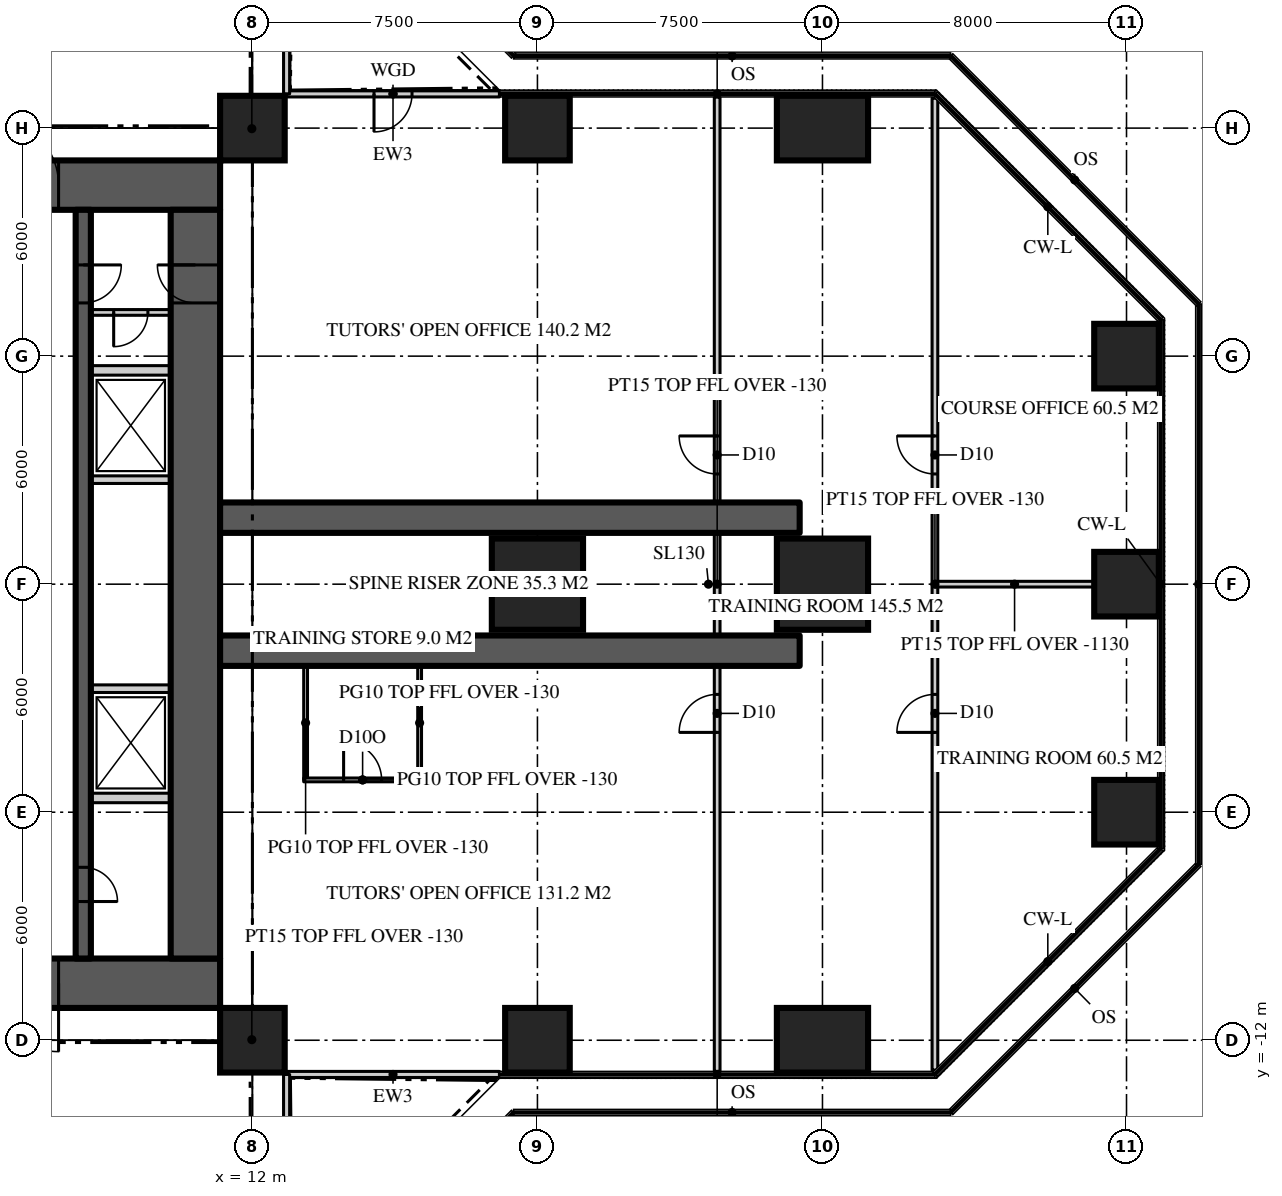
"""IFC4 building model, lengths in metres.
Left out: names, types, materials, properties, quantities, classifications, styles, units other than length and angle.
Written with IfcOpenShell. Run it as: python <this file> out.ifc"""

import sys

from ifc_helpers import new_model, si_unit, direction, frame, frame_2d, origin, origin_2d, place, context, subcontext, project, spatial, rectangle, extrude, element, fill, save


model = new_model("IFC4")
c1 = context("Model", 3, precision=1e-05, world=origin(), true_north=direction((0.0, 1.0)))
c2 = subcontext(c1, "Body", "Model", "MODEL_VIEW")
j1 = project(units=[si_unit("LENGTHUNIT", "METRE"), si_unit("PLANEANGLEUNIT", "RADIAN")], contexts=[c1])
p1 = place(None, origin())
s1 = spatial("IfcSite", under=j1, at=p1, CompositionType="ELEMENT")
p2 = place(p1, origin())
s2 = spatial("IfcBuilding", under=s1, at=p2, CompositionType="ELEMENT")
p3 = place(p2, frame((0.0, 0.0, 109.8)))
s3 = spatial("IfcBuildingStorey", under=s2, at=p3, CompositionType="ELEMENT", Elevation=109.8)
p4 = place(p3, frame((-11.15, 10.5, 0.0), z_axis=(0.0, 0.0, 1.0), x_axis=(1.0, 0.0, 0.0)))
e1 = element("IfcWall", 1, at=p4, inside=s3, PredefinedType="SHEAR", context=c2, shape_type="SweptSolid", body=[
    extrude(rectangle(XDim=22.3, YDim=1.3, at=frame_2d((11.15, 0.0))), origin(), (0.0, 0.0, 1.0), 3.9),
])
p5 = place(p4, frame((4.25, 0.0, 0.0)))
e2 = element("IfcOpeningElement", 2, at=p5, cuts=e1, PredefinedType="OPENING", context=c2, shape_type="SweptSolid", body=[
    extrude(rectangle(XDim=1.8, YDim=2.2, at=frame_2d((0.9, 1.1))), frame((0.0, 0.66, 0.0), z_axis=(0.0, -1.0, 0.0), x_axis=(1.0, 0.0, 0.0)), (0.0, 0.0, 1.0), 1.32),
])
p6 = place(p4, frame((16.25, 0.0, 0.0)))
e3 = element("IfcOpeningElement", 3, at=p6, cuts=e1, PredefinedType="OPENING", context=c2, shape_type="SweptSolid", body=[
    extrude(rectangle(XDim=1.8, YDim=2.2, at=frame_2d((0.9, 1.1))), frame((0.0, 0.66, 0.0), z_axis=(0.0, -1.0, 0.0), x_axis=(1.0, 0.0, 0.0)), (0.0, 0.0, 1.0), 1.32),
])
p7 = place(p3, frame((11.15, -10.5, 0.0), z_axis=(0.0, 0.0, 1.0), x_axis=(-1.0, 0.0, 0.0)))
e4 = element("IfcWall", 4, at=p7, inside=s3, PredefinedType="SHEAR", context=c2, shape_type="SweptSolid", body=[
    extrude(rectangle(XDim=22.3, YDim=1.3, at=frame_2d((11.15, 0.0))), origin(), (0.0, 0.0, 1.0), 3.9),
])
p8 = place(p7, frame((16.25, 0.0, 0.0)))
e5 = element("IfcOpeningElement", 5, at=p8, cuts=e4, PredefinedType="OPENING", context=c2, shape_type="SweptSolid", body=[
    extrude(rectangle(XDim=1.8, YDim=2.2, at=frame_2d((0.9, 1.1))), frame((0.0, 0.66, 0.0), z_axis=(0.0, -1.0, 0.0), x_axis=(1.0, 0.0, 0.0)), (0.0, 0.0, 1.0), 1.32),
])
p9 = place(p7, frame((4.25, 0.0, 0.0)))
e6 = element("IfcOpeningElement", 6, at=p9, cuts=e4, PredefinedType="OPENING", context=c2, shape_type="SweptSolid", body=[
    extrude(rectangle(XDim=1.8, YDim=2.2, at=frame_2d((0.9, 1.1))), frame((0.0, 0.66, 0.0), z_axis=(0.0, -1.0, 0.0), x_axis=(1.0, 0.0, 0.0)), (0.0, 0.0, 1.0), 1.32),
])
p10 = place(p3, frame((10.5, -9.85, 0.0), z_axis=(0.0, 0.0, 1.0), x_axis=(0.0, 1.0, 0.0)))
e7 = element("IfcWall", 7, at=p10, inside=s3, PredefinedType="SHEAR", context=c2, shape_type="SweptSolid", body=[
    extrude(rectangle(XDim=19.7, YDim=1.3, at=frame_2d((9.85, 0.0))), origin(), (0.0, 0.0, 1.0), 3.9),
])
p11 = place(p10, frame((17.25, 0.0, 0.0)))
e8 = element("IfcOpeningElement", 8, at=p11, cuts=e7, PredefinedType="OPENING", context=c2, shape_type="SweptSolid", body=[
    extrude(rectangle(XDim=1.0, YDim=2.2, at=frame_2d((0.5, 1.1))), frame((0.0, 0.66, 0.0), z_axis=(0.0, -1.0, 0.0), x_axis=(1.0, 0.0, 0.0)), (0.0, 0.0, 1.0), 1.32),
])
for number, where, z_axis, x_axis in (
    (9, (11.15, -1.75, 0.0), (0.0, 0.0, 1.0), (1.0, 0.0, 0.0)),
    (10, (11.15, 1.75, 0.0), (0.0, 0.0, 1.0), (1.0, 0.0, 0.0)),
):
    element("IfcWall", number, at=place(p3, frame(where, z_axis=z_axis, x_axis=x_axis)), inside=s3, PredefinedType="SHEAR", context=c2, shape_type="SweptSolid", body=[
        extrude(rectangle(XDim=15.25, YDim=0.8, at=frame_2d((7.625, 0.0))), origin(), (0.0, 0.0, 1.0), 3.9),
    ])
for number, where, z_axis, x_axis in (
    (11, (12.0, -12.0, 0.0), (0.0, 0.0, 1.0), (1.0, 0.0, 0.0)),
    (12, (19.5, -12.0, 0.0), (0.0, 0.0, 1.0), (1.0, 0.0, 0.0)),
):
    element("IfcColumn", number, at=place(p3, frame(where, z_axis=z_axis, x_axis=x_axis)), inside=s3, PredefinedType="COLUMN", context=c2, shape_type="SweptSolid", body=[
        extrude(rectangle(XDim=1.7, YDim=1.7, at=origin_2d()), origin(), (0.0, 0.0, 1.0), 3.9),
    ])
p12 = place(p3, frame((27.0, -12.0, 0.0), z_axis=(0.0, 0.0, 1.0), x_axis=(0.0, 1.0, 0.0)))
e13 = element("IfcColumn", 13, at=p12, inside=s3, PredefinedType="COLUMN", context=c2, shape_type="SweptSolid", body=[
    extrude(rectangle(XDim=1.7, YDim=2.4, at=origin_2d()), origin(), (0.0, 0.0, 1.0), 3.9),
])
p13 = place(p3, frame((35.0, -6.0, 0.0), z_axis=(0.0, 0.0, 1.0), x_axis=(1.0, 0.0, 0.0)))
e14 = element("IfcColumn", 14, at=p13, inside=s3, PredefinedType="COLUMN", context=c2, shape_type="SweptSolid", body=[
    extrude(rectangle(XDim=1.7, YDim=1.7, at=origin_2d()), origin(), (0.0, 0.0, 1.0), 3.9),
])
for number, where, z_axis, x_axis in (
    (15, (19.5, 0.0, 0.0), (0.0, 0.0, 1.0), (1.0, 0.0, 0.0)),
    (16, (27.0, 0.0, 0.0), (0.0, 0.0, 1.0), (1.0, 0.0, 0.0)),
):
    element("IfcColumn", number, at=place(p3, frame(where, z_axis=z_axis, x_axis=x_axis)), inside=s3, PredefinedType="COLUMN", context=c2, shape_type="SweptSolid", body=[
        extrude(rectangle(XDim=2.4, YDim=2.4, at=origin_2d()), origin(), (0.0, 0.0, 1.0), 3.9),
    ])
for number, where, z_axis, x_axis in (
    (17, (35.0, 0.0, 0.0), (0.0, 0.0, 1.0), (1.0, 0.0, 0.0)),
    (18, (35.0, 6.0, 0.0), (0.0, 0.0, 1.0), (1.0, 0.0, 0.0)),
    (19, (12.0, 12.0, 0.0), (0.0, 0.0, 1.0), (1.0, 0.0, 0.0)),
    (20, (19.5, 12.0, 0.0), (0.0, 0.0, 1.0), (1.0, 0.0, 0.0)),
):
    element("IfcColumn", number, at=place(p3, frame(where, z_axis=z_axis, x_axis=x_axis)), inside=s3, PredefinedType="COLUMN", context=c2, shape_type="SweptSolid", body=[
        extrude(rectangle(XDim=1.7, YDim=1.7, at=origin_2d()), origin(), (0.0, 0.0, 1.0), 3.9),
    ])
p14 = place(p3, frame((27.0, 12.0, 0.0), z_axis=(0.0, 0.0, 1.0), x_axis=(0.0, 1.0, 0.0)))
e21 = element("IfcColumn", 21, at=p14, inside=s3, PredefinedType="COLUMN", context=c2, shape_type="SweptSolid", body=[
    extrude(rectangle(XDim=1.7, YDim=2.4, at=origin_2d()), origin(), (0.0, 0.0, 1.0), 3.9),
])
p15 = place(p3, frame((12.9, -12.9, 0.0), z_axis=(0.0, 0.0, 1.0), x_axis=(1.0, 0.0, 0.0)))
e22 = element("IfcWall", 22, at=p15, inside=s3, PredefinedType="SOLIDWALL", context=c2, shape_type="SweptSolid", body=[
    extrude(rectangle(XDim=5.6, YDim=0.16, at=frame_2d((2.8, 0.0))), origin(), (0.0, 0.0, 1.0), 3.77),
])
p16 = place(p3, frame((18.5, 12.9, 0.0), z_axis=(0.0, 0.0, 1.0), x_axis=(-1.0, 0.0, 0.0)))
e23 = element("IfcWall", 23, at=p16, inside=s3, PredefinedType="SOLIDWALL", context=c2, shape_type="SweptSolid", body=[
    extrude(rectangle(XDim=5.6, YDim=0.16, at=frame_2d((2.8, 0.0))), origin(), (0.0, 0.0, 1.0), 3.77),
])
p17 = place(p16, frame((2.3, 0.0, 0.0)))
e24 = element("IfcOpeningElement", 24, at=p17, cuts=e23, PredefinedType="OPENING", context=c2, shape_type="SweptSolid", body=[
    extrude(rectangle(XDim=1.0, YDim=2.2, at=frame_2d((0.5, 1.1))), frame((0.0, 0.09, 0.0), z_axis=(0.0, -1.0, 0.0), x_axis=(1.0, 0.0, 0.0)), (0.0, 0.0, 1.0), 0.18),
])
p18 = place(p3, frame((12.9, 12.9, 0.0), z_axis=(0.0, 0.0, 1.0), x_axis=(0.0, 1.0, 0.0)))
e25 = element("IfcWall", 25, at=p18, inside=s3, PredefinedType="SOLIDWALL", context=c2, shape_type="SweptSolid", body=[
    extrude(rectangle(XDim=5.6, YDim=0.16, at=frame_2d((2.8, 0.0))), origin(), (0.0, 0.0, 1.0), 3.77),
])
p19 = place(p3, frame((12.9, -18.5, 0.0), z_axis=(0.0, 0.0, 1.0), x_axis=(0.0, 1.0, 0.0)))
e26 = element("IfcWall", 26, at=p19, inside=s3, PredefinedType="SOLIDWALL", context=c2, shape_type="SweptSolid", body=[
    extrude(rectangle(XDim=5.6, YDim=0.16, at=frame_2d((2.8, 0.0))), origin(), (0.0, 0.0, 1.0), 3.77),
])
p20 = place(p19, frame((2.3, 0.0, 0.0)))
e27 = element("IfcOpeningElement", 27, at=p20, cuts=e26, PredefinedType="OPENING", context=c2, shape_type="SweptSolid", body=[
    extrude(rectangle(XDim=1.0, YDim=2.2, at=frame_2d((0.5, 1.1))), frame((0.0, 0.09, 0.0), z_axis=(0.0, -1.0, 0.0), x_axis=(1.0, 0.0, 0.0)), (0.0, 0.0, 1.0), 0.18),
])
p21 = place(p3, frame((7.55, 9.85, 0.0), z_axis=(0.0, 0.0, 1.0), x_axis=(0.0, -1.0, 0.0)))
e28 = element("IfcWall", 28, at=p21, inside=s3, PredefinedType="SHEAR", context=c2, shape_type="SweptSolid", body=[
    extrude(rectangle(XDim=19.7, YDim=0.4, at=frame_2d((9.85, 0.0))), origin(), (0.0, 0.0, 1.0), 3.9),
])
p22 = place(p21, frame((1.45, 0.0, 0.0)))
e29 = element("IfcOpeningElement", 29, at=p22, cuts=e28, PredefinedType="OPENING", context=c2, shape_type="SweptSolid", body=[
    extrude(rectangle(XDim=1.0, YDim=2.2, at=frame_2d((0.5, 1.1))), frame((0.0, 0.21, 0.0), z_axis=(0.0, -1.0, 0.0), x_axis=(1.0, 0.0, 0.0)), (0.0, 0.0, 1.0), 0.42),
])
p23 = place(p21, frame((17.3, 0.0, 0.0)))
e30 = element("IfcOpeningElement", 30, at=p23, cuts=e28, PredefinedType="OPENING", context=c2, shape_type="SweptSolid", body=[
    extrude(rectangle(XDim=0.9, YDim=2.1, at=frame_2d((0.45, 1.05))), frame((0.0, 0.21, 0.0), z_axis=(0.0, -1.0, 0.0), x_axis=(1.0, 0.0, 0.0)), (0.0, 0.0, 1.0), 0.42),
])
for number, where, z_axis, x_axis in (
    (31, (7.75, 5.625, 0.0), (0.0, 0.0, 1.0), (1.0, 0.0, 0.0)),
    (32, (7.75, -5.625, 0.0), (0.0, 0.0, 1.0), (1.0, 0.0, 0.0)),
):
    element("IfcWall", number, at=place(p3, frame(where, z_axis=z_axis, x_axis=x_axis)), inside=s3, PredefinedType="SOLIDWALL", context=c2, shape_type="SweptSolid", body=[
        extrude(rectangle(XDim=2.1, YDim=0.25, at=frame_2d((1.05, 0.0))), origin(), (0.0, 0.0, 1.0), 3.7),
    ])
for number, where, z_axis, x_axis in (
    (33, (7.75, -2.75, 0.0), (0.0, 0.0, 1.0), (1.0, 0.0, 0.0)),
    (34, (7.75, 2.75, 0.0), (0.0, 0.0, 1.0), (1.0, 0.0, 0.0)),
):
    element("IfcWall", number, at=place(p3, frame(where, z_axis=z_axis, x_axis=x_axis)), inside=s3, PredefinedType="SOLIDWALL", context=c2, shape_type="SweptSolid", body=[
        extrude(rectangle(XDim=2.1, YDim=0.2, at=frame_2d((1.05, 0.0))), origin(), (0.0, 0.0, 1.0), 3.7),
    ])
p24 = place(p3, frame((24.229, -12.82, 0.0), z_axis=(0.0, 0.0, 1.0), x_axis=(0.0, 1.0, 0.0)))
e35 = element("IfcWall", 35, at=p24, inside=s3, PredefinedType="PARTITIONING", context=c2, shape_type="SweptSolid", body=[
    extrude(rectangle(XDim=25.64, YDim=0.15, at=frame_2d((12.82, 0.0))), origin(), (0.0, 0.0, 1.0), 3.77),
])
p25 = place(p24, frame((15.72, 0.0, 0.0)))
e36 = element("IfcOpeningElement", 36, at=p25, cuts=e35, PredefinedType="OPENING", context=c2, shape_type="SweptSolid", body=[
    extrude(rectangle(XDim=1.0, YDim=2.2, at=frame_2d((0.5, 1.1))), frame((0.0, 0.085, 0.0), z_axis=(0.0, -1.0, 0.0), x_axis=(1.0, 0.0, 0.0)), (0.0, 0.0, 1.0), 0.17),
])
p26 = place(p24, frame((8.92, 0.0, 0.0)))
e37 = element("IfcOpeningElement", 37, at=p26, cuts=e35, PredefinedType="OPENING", context=c2, shape_type="SweptSolid", body=[
    extrude(rectangle(XDim=1.0, YDim=2.2, at=frame_2d((0.5, 1.1))), frame((0.0, 0.085, 0.0), z_axis=(0.0, -1.0, 0.0), x_axis=(1.0, 0.0, 0.0)), (0.0, 0.0, 1.0), 0.17),
])
p27 = place(p3, frame((29.959, -12.786, 0.0), z_axis=(0.0, 0.0, 1.0), x_axis=(0.0, 1.0, 0.0)))
e38 = element("IfcWall", 38, at=p27, inside=s3, PredefinedType="PARTITIONING", context=c2, shape_type="SweptSolid", body=[
    extrude(rectangle(XDim=25.573, YDim=0.15, at=frame_2d((12.786, 0.0))), origin(), (0.0, 0.0, 1.0), 3.77),
])
p28 = place(p27, frame((15.687, 0.0, 0.0)))
e39 = element("IfcOpeningElement", 39, at=p28, cuts=e38, PredefinedType="OPENING", context=c2, shape_type="SweptSolid", body=[
    extrude(rectangle(XDim=1.0, YDim=2.2, at=frame_2d((0.5, 1.1))), frame((0.0, 0.085, 0.0), z_axis=(0.0, -1.0, 0.0), x_axis=(1.0, 0.0, 0.0)), (0.0, 0.0, 1.0), 0.17),
])
p29 = place(p27, frame((8.886, 0.0, 0.0)))
e40 = element("IfcOpeningElement", 40, at=p29, cuts=e38, PredefinedType="OPENING", context=c2, shape_type="SweptSolid", body=[
    extrude(rectangle(XDim=1.0, YDim=2.2, at=frame_2d((0.5, 1.1))), frame((0.0, 0.085, 0.0), z_axis=(0.0, -1.0, 0.0), x_axis=(1.0, 0.0, 0.0)), (0.0, 0.0, 1.0), 0.17),
])
p30 = place(p3, frame((29.959, 0.0, 0.0), z_axis=(0.0, 0.0, 1.0), x_axis=(1.0, 0.0, 0.0)))
e41 = element("IfcWall", 41, at=p30, inside=s3, PredefinedType="PARTITIONING", context=c2, shape_type="SweptSolid", body=[
    extrude(rectangle(XDim=4.191, YDim=0.15, at=frame_2d((2.095, 0.0))), origin(), (0.0, 0.0, 1.0), 2.77),
])
for number, where, z_axis, x_axis in (
    (42, (13.4, -2.15, 0.0), (0.0, 0.0, 1.0), (0.0, -1.0, 0.0)),
    (43, (16.4, -2.15, 0.0), (0.0, 0.0, 1.0), (0.0, -1.0, 0.0)),
):
    element("IfcWall", number, at=place(p3, frame(where, z_axis=z_axis, x_axis=x_axis)), inside=s3, PredefinedType="PARTITIONING", context=c2, shape_type="SweptSolid", body=[
        extrude(rectangle(XDim=3.0, YDim=0.1, at=frame_2d((1.5, 0.0))), origin(), (0.0, 0.0, 1.0), 3.77),
    ])
p31 = place(p3, frame((13.35, -5.15, 0.0), z_axis=(0.0, 0.0, 1.0), x_axis=(1.0, 0.0, 0.0)))
e44 = element("IfcWall", 44, at=p31, inside=s3, PredefinedType="PARTITIONING", context=c2, shape_type="SweptSolid", body=[
    extrude(rectangle(XDim=3.1, YDim=0.1, at=frame_2d((1.55, 0.0))), origin(), (0.0, 0.0, 1.0), 3.77),
])
p32 = place(p31, frame((1.05, 0.0, 0.0)))
e45 = element("IfcOpeningElement", 45, at=p32, cuts=e44, PredefinedType="OPENING", context=c2, shape_type="SweptSolid", body=[
    extrude(rectangle(XDim=1.0, YDim=2.2, at=frame_2d((0.5, 1.1))), frame((0.0, 0.06, 0.0), z_axis=(0.0, -1.0, 0.0), x_axis=(1.0, 0.0, 0.0)), (0.0, 0.0, 1.0), 0.12),
])
for number, where, z_axis, x_axis in (
    (46, (11.15, 11.15, 0.0), (0.0, 0.0, 1.0), (0.707, 0.707, 0.0)),
    (47, (11.15, -11.15, 0.0), (0.0, 0.0, 1.0), (0.707, -0.707, 0.0)),
):
    element("IfcWall", number, at=place(p3, frame(where, z_axis=z_axis, x_axis=x_axis)), inside=s3, PredefinedType="PARTITIONING", context=c2, shape_type="SweptSolid", body=[
        extrude(rectangle(XDim=2.362, YDim=0.15, at=frame_2d((1.181, 0.0))), origin(), (0.0, 0.0, 1.0), 3.77),
    ])
p33 = place(p3, frame((9.85, 7.15, 0.0), z_axis=(0.0, 0.0, 1.0), x_axis=(-1.0, 0.0, 0.0)))
e48 = element("IfcWall", 48, at=p33, inside=s3, PredefinedType="SOLIDWALL", context=c2, shape_type="SweptSolid", body=[
    extrude(rectangle(XDim=2.1, YDim=0.15, at=frame_2d((1.05, 0.0))), origin(), (0.0, 0.0, 1.0), 3.77),
])
p34 = place(p33, frame((0.6, 0.0, 0.0)))
e49 = element("IfcOpeningElement", 49, at=p34, cuts=e48, PredefinedType="OPENING", context=c2, shape_type="SweptSolid", body=[
    extrude(rectangle(XDim=0.9, YDim=2.1, at=frame_2d((0.45, 1.05))), frame((0.0, 0.085, 0.0), z_axis=(0.0, -1.0, 0.0), x_axis=(1.0, 0.0, 0.0)), (0.0, 0.0, 1.0), 0.17),
])
p35 = place(p17, origin())
e50 = element("IfcDoor", 50, at=p35, inside=s3, OperationType="SINGLE_SWING_RIGHT", PredefinedType="DOOR", context=c2, shape_type="SweptSolid", body=[
    extrude(rectangle(XDim=1.0, YDim=2.2, at=frame_2d((0.5, 1.1))), frame((0.0, 0.025, 0.0), z_axis=(0.0, -1.0, 0.0), x_axis=(1.0, 0.0, 0.0)), (0.0, 0.0, 1.0), 0.05),
])
fill(e24, e50)
p36 = place(p6, origin())
e51 = element("IfcDoor", 51, at=p36, inside=s3, OperationType="DOUBLE_DOOR_DOUBLE_SWING", PredefinedType="DOOR", context=c2, shape_type="SweptSolid", body=[
    extrude(rectangle(XDim=1.8, YDim=2.2, at=frame_2d((0.9, 1.1))), frame((0.0, 0.025, 0.0), z_axis=(0.0, -1.0, 0.0), x_axis=(1.0, 0.0, 0.0)), (0.0, 0.0, 1.0), 0.05),
])
fill(e3, e51)
p37 = place(p9, origin())
e52 = element("IfcDoor", 52, at=p37, inside=s3, OperationType="DOUBLE_DOOR_DOUBLE_SWING", PredefinedType="DOOR", context=c2, shape_type="SweptSolid", body=[
    extrude(rectangle(XDim=1.8, YDim=2.2, at=frame_2d((0.9, 1.1))), frame((0.0, 0.025, 0.0), z_axis=(0.0, -1.0, 0.0), x_axis=(1.0, 0.0, 0.0)), (0.0, 0.0, 1.0), 0.05),
])
fill(e6, e52)
p38 = place(p22, origin())
e53 = element("IfcDoor", 53, at=p38, inside=s3, OperationType="SINGLE_SWING_LEFT", PredefinedType="DOOR", context=c2, shape_type="SweptSolid", body=[
    extrude(rectangle(XDim=1.0, YDim=2.2, at=frame_2d((0.5, 1.1))), frame((0.0, 0.025, 0.0), z_axis=(0.0, -1.0, 0.0), x_axis=(1.0, 0.0, 0.0)), (0.0, 0.0, 1.0), 0.05),
])
fill(e29, e53)
p39 = place(p11, origin())
e54 = element("IfcDoor", 54, at=p39, inside=s3, OperationType="SINGLE_SWING_RIGHT", PredefinedType="DOOR", context=c2, shape_type="SweptSolid", body=[
    extrude(rectangle(XDim=1.0, YDim=2.2, at=frame_2d((0.5, 1.1))), frame((0.0, 0.025, 0.0), z_axis=(0.0, -1.0, 0.0), x_axis=(1.0, 0.0, 0.0)), (0.0, 0.0, 1.0), 0.05),
])
fill(e8, e54)
p40 = place(p23, origin())
e55 = element("IfcDoor", 55, at=p40, inside=s3, OperationType="SINGLE_SWING_RIGHT", PredefinedType="DOOR", context=c2, shape_type="SweptSolid", body=[
    extrude(rectangle(XDim=0.9, YDim=2.1, at=frame_2d((0.45, 1.05))), frame((0.0, 0.025, 0.0), z_axis=(0.0, -1.0, 0.0), x_axis=(1.0, 0.0, 0.0)), (0.0, 0.0, 1.0), 0.05),
])
fill(e30, e55)
p41 = place(p25, origin())
e56 = element("IfcDoor", 56, at=p41, inside=s3, OperationType="SINGLE_SWING_RIGHT", PredefinedType="DOOR", context=c2, shape_type="SweptSolid", body=[
    extrude(rectangle(XDim=1.0, YDim=2.2, at=frame_2d((0.5, 1.1))), frame((0.0, 0.025, 0.0), z_axis=(0.0, -1.0, 0.0), x_axis=(1.0, 0.0, 0.0)), (0.0, 0.0, 1.0), 0.05),
])
fill(e36, e56)
p42 = place(p26, origin())
e57 = element("IfcDoor", 57, at=p42, inside=s3, OperationType="SINGLE_SWING_LEFT", PredefinedType="DOOR", context=c2, shape_type="SweptSolid", body=[
    extrude(rectangle(XDim=1.0, YDim=2.2, at=frame_2d((0.5, 1.1))), frame((0.0, 0.025, 0.0), z_axis=(0.0, -1.0, 0.0), x_axis=(1.0, 0.0, 0.0)), (0.0, 0.0, 1.0), 0.05),
])
fill(e37, e57)
p43 = place(p28, origin())
e58 = element("IfcDoor", 58, at=p43, inside=s3, OperationType="SINGLE_SWING_RIGHT", PredefinedType="DOOR", context=c2, shape_type="SweptSolid", body=[
    extrude(rectangle(XDim=1.0, YDim=2.2, at=frame_2d((0.5, 1.1))), frame((0.0, 0.025, 0.0), z_axis=(0.0, -1.0, 0.0), x_axis=(1.0, 0.0, 0.0)), (0.0, 0.0, 1.0), 0.05),
])
fill(e39, e58)
p44 = place(p29, origin())
e59 = element("IfcDoor", 59, at=p44, inside=s3, OperationType="SINGLE_SWING_LEFT", PredefinedType="DOOR", context=c2, shape_type="SweptSolid", body=[
    extrude(rectangle(XDim=1.0, YDim=2.2, at=frame_2d((0.5, 1.1))), frame((0.0, 0.025, 0.0), z_axis=(0.0, -1.0, 0.0), x_axis=(1.0, 0.0, 0.0)), (0.0, 0.0, 1.0), 0.05),
])
fill(e40, e59)
p45 = place(p32, origin())
e60 = element("IfcDoor", 60, at=p45, inside=s3, OperationType="SINGLE_SWING_LEFT", PredefinedType="DOOR", context=c2, shape_type="SweptSolid", body=[
    extrude(rectangle(XDim=1.0, YDim=2.2, at=frame_2d((0.5, 1.1))), frame((0.0, 0.025, 0.0), z_axis=(0.0, -1.0, 0.0), x_axis=(1.0, 0.0, 0.0)), (0.0, 0.0, 1.0), 0.05),
])
fill(e45, e60)
p46 = place(p34, origin())
e61 = element("IfcDoor", 61, at=p46, inside=s3, OperationType="SINGLE_SWING_RIGHT", PredefinedType="DOOR", context=c2, shape_type="SweptSolid", body=[
    extrude(rectangle(XDim=0.9, YDim=2.1, at=frame_2d((0.45, 1.05))), frame((0.0, 0.025, 0.0), z_axis=(0.0, -1.0, 0.0), x_axis=(1.0, 0.0, 0.0)), (0.0, 0.0, 1.0), 0.05),
])
fill(e49, e61)
save(model, sys.argv[1])
